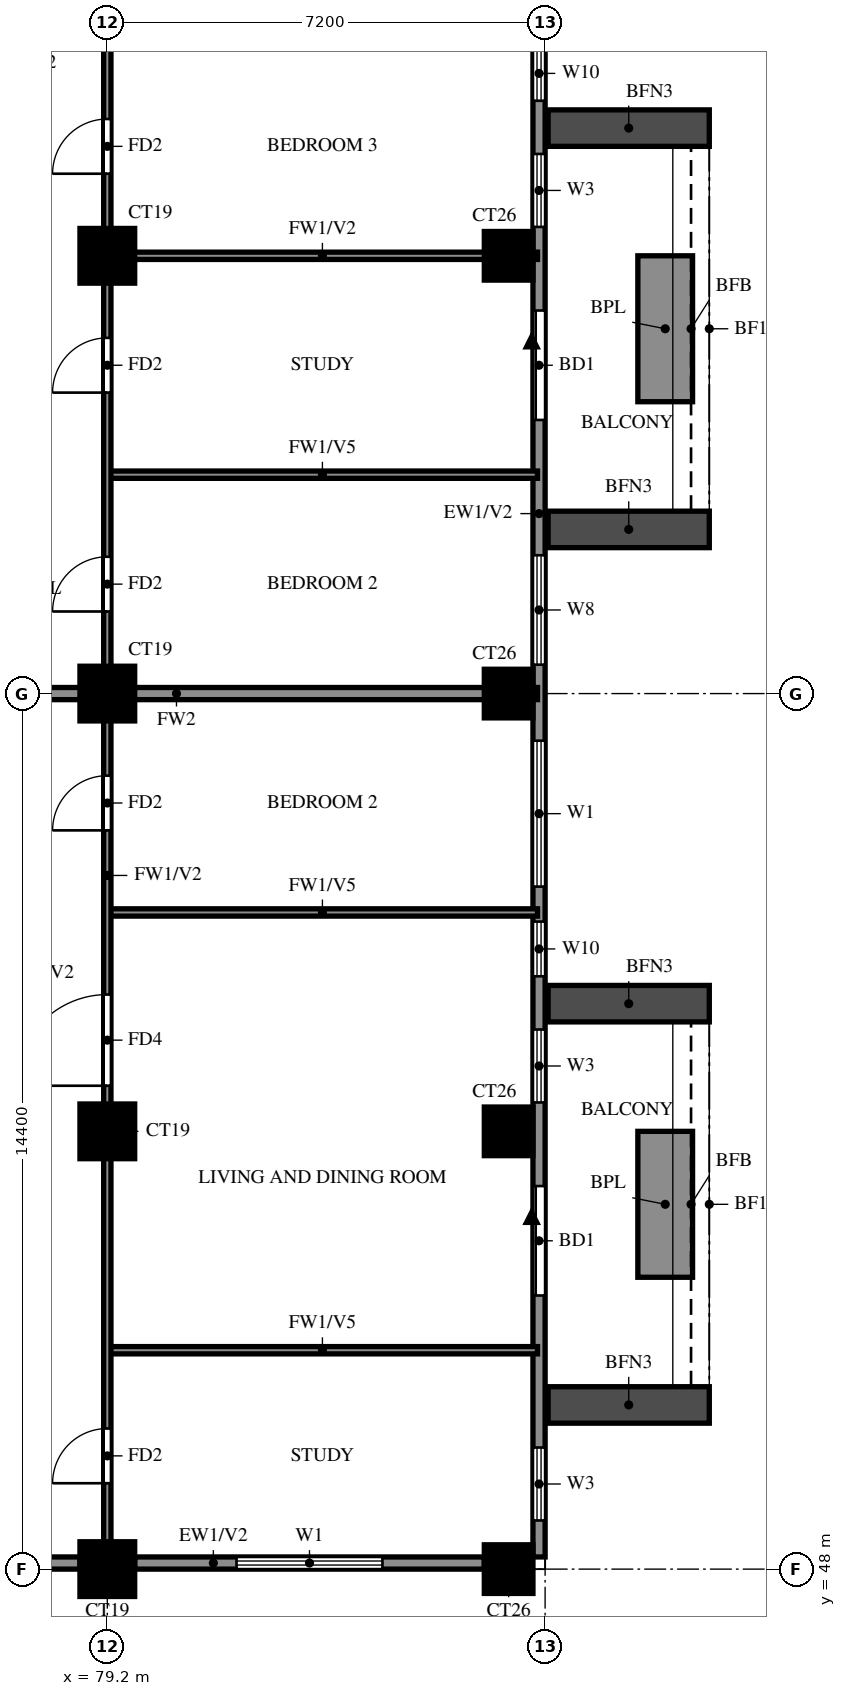
"""IFC4 building model, lengths in metres.
Left out: names, types, materials, properties, quantities, classifications, styles, units other than length and angle.
Written with IfcOpenShell. Run it as: python <this file> out.ifc"""

import sys

from ifc_helpers import new_model, si_unit, direction, frame, frame_2d, origin, origin_2d, place, context, subcontext, project, spatial, rectangle, extrude, source, transform, mapped, element, fill, save


model = new_model("IFC4")
c1 = context("Model", 3, precision=1e-05, world=origin(), true_north=direction((0.0, 1.0)))
c2 = subcontext(c1, "Body", "Model", "MODEL_VIEW")
j1 = project(units=[si_unit("LENGTHUNIT", "METRE"), si_unit("PLANEANGLEUNIT", "RADIAN")], contexts=[c1])
p1 = place(None, origin())
s1 = spatial("IfcSite", under=j1, at=p1, CompositionType="ELEMENT")
p2 = place(p1, origin())
s2 = spatial("IfcBuilding", under=s1, at=p2, CompositionType="ELEMENT")
p3 = place(p2, frame((0.0, 0.0, 188.5)))
s3 = spatial("IfcBuildingStorey", under=s2, at=p3, CompositionType="ELEMENT", Elevation=188.5)
m1 = source(origin(), c2, "Body", "SweptSolid", [
    extrude(rectangle(XDim=0.9, YDim=0.9, at=origin_2d()), origin(), (0.0, 0.0, 1.0), 3.2),
])
p4 = place(p3, frame((79.2, 48.0, 0.0), z_axis=(0.0, 0.0, 1.0), x_axis=(1.0, 0.0, 0.0)))
e1 = element("IfcColumn", 1, at=p4, inside=s3, PredefinedType="COLUMN", context=c2, shape_type="MappedRepresentation", body=[
    mapped(m1, transform((0.0, 0.0, 0.0))),
])
m2 = source(origin(), c2, "Body", "SweptSolid", [
    extrude(rectangle(XDim=0.8, YDim=0.8, at=origin_2d()), origin(), (0.0, 0.0, 1.0), 3.2),
])
p5 = place(p3, frame((85.8, 48.0, 0.0), z_axis=(0.0, 0.0, 1.0), x_axis=(1.0, 0.0, 0.0)))
e2 = element("IfcColumn", 2, at=p5, inside=s3, PredefinedType="COLUMN", context=c2, shape_type="MappedRepresentation", body=[
    mapped(m2, transform((0.0, 0.0, 0.0))),
])
p6 = place(p3, frame((79.2, 55.2, 0.0), z_axis=(0.0, 0.0, 1.0), x_axis=(1.0, 0.0, 0.0)))
e3 = element("IfcColumn", 3, at=p6, inside=s3, PredefinedType="COLUMN", context=c2, shape_type="MappedRepresentation", body=[
    mapped(m1, transform((0.0, 0.0, 0.0))),
])
p7 = place(p3, frame((85.8, 55.2, 0.0), z_axis=(0.0, 0.0, 1.0), x_axis=(1.0, 0.0, 0.0)))
e4 = element("IfcColumn", 4, at=p7, inside=s3, PredefinedType="COLUMN", context=c2, shape_type="MappedRepresentation", body=[
    mapped(m2, transform((0.0, 0.0, 0.0))),
])
p8 = place(p3, frame((79.2, 62.4, 0.0), z_axis=(0.0, 0.0, 1.0), x_axis=(1.0, 0.0, 0.0)))
e5 = element("IfcColumn", 5, at=p8, inside=s3, PredefinedType="COLUMN", context=c2, shape_type="MappedRepresentation", body=[
    mapped(m1, transform((0.0, 0.0, 0.0))),
])
p9 = place(p3, frame((85.8, 62.4, 0.0), z_axis=(0.0, 0.0, 1.0), x_axis=(1.0, 0.0, 0.0)))
e6 = element("IfcColumn", 6, at=p9, inside=s3, PredefinedType="COLUMN", context=c2, shape_type="MappedRepresentation", body=[
    mapped(m2, transform((0.0, 0.0, 0.0))),
])
p10 = place(p3, frame((79.2, 69.6, 0.0), z_axis=(0.0, 0.0, 1.0), x_axis=(1.0, 0.0, 0.0)))
e7 = element("IfcColumn", 7, at=p10, inside=s3, PredefinedType="COLUMN", context=c2, shape_type="MappedRepresentation", body=[
    mapped(m1, transform((0.0, 0.0, 0.0))),
])
p11 = place(p3, frame((85.8, 69.6, 0.0), z_axis=(0.0, 0.0, 1.0), x_axis=(1.0, 0.0, 0.0)))
e8 = element("IfcColumn", 8, at=p11, inside=s3, PredefinedType="COLUMN", context=c2, shape_type="MappedRepresentation", body=[
    mapped(m2, transform((0.0, 0.0, 0.0))),
])
p12 = place(p3, frame((85.719, 39.881, 0.0), z_axis=(0.0, 0.0, 1.0), x_axis=(-0.86377618652, 0.503875678716, 0.0)))
e9 = element("IfcWall", 9, at=p12, inside=s3, PredefinedType="SOLIDWALL", context=c2, shape_type="SweptSolid", body=[
    extrude(rectangle(XDim=16.311, YDim=0.2, at=frame_2d((8.156, 0.0))), origin(), (0.0, 0.0, 1.0), 3.2),
])
p13 = place(p12, frame((13.326, 0.0, 1.5)))
e10 = element("IfcOpeningElement", 10, at=p13, cuts=e9, PredefinedType="OPENING", context=c2, shape_type="SweptSolid", body=[
    extrude(rectangle(XDim=0.9, YDim=0.9, at=frame_2d((0.45, 0.45))), frame((0.0, 0.11, 0.0), z_axis=(0.0, -1.0, 0.0), x_axis=(1.0, 0.0, 0.0)), (0.0, 0.0, 1.0), 0.22),
])
p14 = place(p3, frame((71.99, 48.1, 0.0), z_axis=(0.0, 0.0, 1.0), x_axis=(1.0, 0.0, 0.0)))
e11 = element("IfcWall", 11, at=p14, inside=s3, PredefinedType="SOLIDWALL", context=c2, shape_type="SweptSolid", body=[
    extrude(rectangle(XDim=6.76, YDim=0.2, at=frame_2d((3.38, 0.0))), origin(), (0.0, 0.0, 1.0), 3.2),
])
p15 = place(p14, frame((2.205, 0.0, 1.5)))
e12 = element("IfcOpeningElement", 12, at=p15, cuts=e11, PredefinedType="OPENING", context=c2, shape_type="SweptSolid", body=[
    extrude(rectangle(XDim=0.9, YDim=0.9, at=frame_2d((0.45, 0.45))), frame((0.0, 0.11, 0.0), z_axis=(0.0, -1.0, 0.0), x_axis=(1.0, 0.0, 0.0)), (0.0, 0.0, 1.0), 0.22),
])
p16 = place(p3, frame((79.65, 48.1, 0.0), z_axis=(0.0, 0.0, 1.0), x_axis=(1.0, 0.0, 0.0)))
e13 = element("IfcWall", 13, at=p16, inside=s3, PredefinedType="SOLIDWALL", context=c2, shape_type="SweptSolid", body=[
    extrude(rectangle(XDim=5.75, YDim=0.2, at=frame_2d((2.875, 0.0))), origin(), (0.0, 0.0, 1.0), 3.2),
])
p17 = place(p16, frame((1.675, 0.0, 0.6)))
e14 = element("IfcOpeningElement", 14, at=p17, cuts=e13, PredefinedType="OPENING", context=c2, shape_type="SweptSolid", body=[
    extrude(rectangle(XDim=2.4, YDim=2.4, at=frame_2d((1.2, 1.2))), frame((0.0, 0.11, 0.0), z_axis=(0.0, -1.0, 0.0), x_axis=(1.0, 0.0, 0.0)), (0.0, 0.0, 1.0), 0.22),
])
p18 = place(p3, frame((86.3, 48.2, 0.0), z_axis=(0.0, 0.0, 1.0), x_axis=(0.0, 1.0, 0.0)))
e15 = element("IfcWall", 15, at=p18, inside=s3, PredefinedType="SOLIDWALL", context=c2, shape_type="SweptSolid", body=[
    extrude(rectangle(XDim=28.6, YDim=0.2, at=frame_2d((14.3, 0.0))), origin(), (0.0, 0.0, 1.0), 3.2),
])
p19 = place(p18, frame((4.3, 0.0, 0.0)))
e16 = element("IfcOpeningElement", 16, at=p19, cuts=e15, PredefinedType="OPENING", context=c2, shape_type="SweptSolid", body=[
    extrude(rectangle(XDim=1.8, YDim=2.4, at=frame_2d((0.9, 1.2))), frame((0.0, 0.11, 0.0), z_axis=(0.0, -1.0, 0.0), x_axis=(1.0, 0.0, 0.0)), (0.0, 0.0, 1.0), 0.22),
])
p20 = place(p18, frame((18.7, 0.0, 0.0)))
e17 = element("IfcOpeningElement", 17, at=p20, cuts=e15, PredefinedType="OPENING", context=c2, shape_type="SweptSolid", body=[
    extrude(rectangle(XDim=1.8, YDim=2.4, at=frame_2d((0.9, 1.2))), frame((0.0, 0.11, 0.0), z_axis=(0.0, -1.0, 0.0), x_axis=(1.0, 0.0, 0.0)), (0.0, 0.0, 1.0), 0.22),
])
p21 = place(p18, frame((0.6, 0.0, 0.6)))
e18 = element("IfcOpeningElement", 18, at=p21, cuts=e15, PredefinedType="OPENING", context=c2, shape_type="SweptSolid", body=[
    extrude(rectangle(XDim=1.2, YDim=2.4, at=frame_2d((0.6, 1.2))), frame((0.0, 0.11, 0.0), z_axis=(0.0, -1.0, 0.0), x_axis=(1.0, 0.0, 0.0)), (0.0, 0.0, 1.0), 0.22),
])
p22 = place(p18, frame((7.475, 0.0, 0.6)))
e19 = element("IfcOpeningElement", 19, at=p22, cuts=e15, PredefinedType="OPENING", context=c2, shape_type="SweptSolid", body=[
    extrude(rectangle(XDim=1.2, YDim=2.4, at=frame_2d((0.6, 1.2))), frame((0.0, 0.11, 0.0), z_axis=(0.0, -1.0, 0.0), x_axis=(1.0, 0.0, 0.0)), (0.0, 0.0, 1.0), 0.22),
])
p23 = place(p18, frame((9.55, 0.0, 0.6)))
e20 = element("IfcOpeningElement", 20, at=p23, cuts=e15, PredefinedType="OPENING", context=c2, shape_type="SweptSolid", body=[
    extrude(rectangle(XDim=0.9, YDim=2.4, at=frame_2d((0.45, 1.2))), frame((0.0, 0.11, 0.0), z_axis=(0.0, -1.0, 0.0), x_axis=(1.0, 0.0, 0.0)), (0.0, 0.0, 1.0), 0.22),
])
p24 = place(p18, frame((11.025, 0.0, 0.6)))
e21 = element("IfcOpeningElement", 21, at=p24, cuts=e15, PredefinedType="OPENING", context=c2, shape_type="SweptSolid", body=[
    extrude(rectangle(XDim=2.4, YDim=2.4, at=frame_2d((1.2, 1.2))), frame((0.0, 0.11, 0.0), z_axis=(0.0, -1.0, 0.0), x_axis=(1.0, 0.0, 0.0)), (0.0, 0.0, 1.0), 0.22),
])
p25 = place(p18, frame((14.675, 0.0, 0.6)))
e22 = element("IfcOpeningElement", 22, at=p25, cuts=e15, PredefinedType="OPENING", context=c2, shape_type="SweptSolid", body=[
    extrude(rectangle(XDim=1.8, YDim=2.4, at=frame_2d((0.9, 1.2))), frame((0.0, 0.11, 0.0), z_axis=(0.0, -1.0, 0.0), x_axis=(1.0, 0.0, 0.0)), (0.0, 0.0, 1.0), 0.22),
])
p26 = place(p18, frame((21.875, 0.0, 0.6)))
e23 = element("IfcOpeningElement", 23, at=p26, cuts=e15, PredefinedType="OPENING", context=c2, shape_type="SweptSolid", body=[
    extrude(rectangle(XDim=1.2, YDim=2.4, at=frame_2d((0.6, 1.2))), frame((0.0, 0.11, 0.0), z_axis=(0.0, -1.0, 0.0), x_axis=(1.0, 0.0, 0.0)), (0.0, 0.0, 1.0), 0.22),
])
p27 = place(p18, frame((23.95, 0.0, 0.6)))
e24 = element("IfcOpeningElement", 24, at=p27, cuts=e15, PredefinedType="OPENING", context=c2, shape_type="SweptSolid", body=[
    extrude(rectangle(XDim=0.9, YDim=2.4, at=frame_2d((0.45, 1.2))), frame((0.0, 0.11, 0.0), z_axis=(0.0, -1.0, 0.0), x_axis=(1.0, 0.0, 0.0)), (0.0, 0.0, 1.0), 0.22),
])
p28 = place(p18, frame((25.425, 0.0, 0.6)))
e25 = element("IfcOpeningElement", 25, at=p28, cuts=e15, PredefinedType="OPENING", context=c2, shape_type="SweptSolid", body=[
    extrude(rectangle(XDim=2.4, YDim=2.4, at=frame_2d((1.2, 1.2))), frame((0.0, 0.11, 0.0), z_axis=(0.0, -1.0, 0.0), x_axis=(1.0, 0.0, 0.0)), (0.0, 0.0, 1.0), 0.22),
])
for number, where, z_axis, x_axis in (
    (26, (86.45, 50.7, 0.0), (0.0, 0.0, 1.0), (1.0, 0.0, 0.0)),
    (27, (86.45, 57.3, 0.0), (0.0, 0.0, 1.0), (1.0, 0.0, 0.0)),
):
    element("IfcWall", number, at=place(p3, frame(where, z_axis=z_axis, x_axis=x_axis)), inside=s3, PredefinedType="SOLIDWALL", context=c2, shape_type="SweptSolid", body=[
        extrude(rectangle(XDim=2.65, YDim=0.6, at=frame_2d((1.325, 0.0))), origin(), (0.0, 0.0, 1.0), 2.85),
    ])
p29 = place(p3, frame((88.375, 52.8, 0.0), z_axis=(0.0, 0.0, 1.0), x_axis=(0.0, 1.0, 0.0)))
e28 = element("IfcWall", 28, at=p29, inside=s3, PredefinedType="SOLIDWALL", context=c2, shape_type="SweptSolid", body=[
    extrude(rectangle(XDim=2.4, YDim=0.9, at=frame_2d((1.2, 0.0))), origin(), (0.0, 0.0, 1.0), 0.9),
])
for number, where, z_axis, x_axis in (
    (29, (86.45, 65.1, 0.0), (0.0, 0.0, 1.0), (1.0, 0.0, 0.0)),
    (30, (86.45, 71.7, 0.0), (0.0, 0.0, 1.0), (1.0, 0.0, 0.0)),
):
    element("IfcWall", number, at=place(p3, frame(where, z_axis=z_axis, x_axis=x_axis)), inside=s3, PredefinedType="SOLIDWALL", context=c2, shape_type="SweptSolid", body=[
        extrude(rectangle(XDim=2.65, YDim=0.6, at=frame_2d((1.325, 0.0))), origin(), (0.0, 0.0, 1.0), 2.85),
    ])
p30 = place(p3, frame((88.375, 67.2, 0.0), z_axis=(0.0, 0.0, 1.0), x_axis=(0.0, 1.0, 0.0)))
e31 = element("IfcWall", 31, at=p30, inside=s3, PredefinedType="SOLIDWALL", context=c2, shape_type="SweptSolid", body=[
    extrude(rectangle(XDim=2.4, YDim=0.9, at=frame_2d((1.2, 0.0))), origin(), (0.0, 0.0, 1.0), 0.9),
])
p31 = place(p3, frame((74.4, 62.4, 0.0), z_axis=(0.0, 0.0, 1.0), x_axis=(1.0, 0.0, 0.0)))
e32 = element("IfcWall", 32, at=p31, inside=s3, PredefinedType="SOLIDWALL", context=c2, shape_type="SweptSolid", body=[
    extrude(rectangle(XDim=11.875, YDim=0.2, at=frame_2d((5.938, 0.0))), origin(), (0.0, 0.0, 1.0), 3.2),
])
for number, where, z_axis, x_axis in (
    (33, (79.2, 51.6, 0.0), (0.0, 0.0, 1.0), (1.0, 0.0, 0.0)),
    (34, (79.2, 58.8, 0.0), (0.0, 0.0, 1.0), (1.0, 0.0, 0.0)),
    (35, (79.2, 66.0, 0.0), (0.0, 0.0, 1.0), (1.0, 0.0, 0.0)),
):
    element("IfcWall", number, at=place(p3, frame(where, z_axis=z_axis, x_axis=x_axis)), inside=s3, PredefinedType="PARTITIONING", context=c2, shape_type="SweptSolid", body=[
        extrude(rectangle(XDim=7.075, YDim=0.12, at=frame_2d((3.538, 0.0))), origin(), (0.0, 0.0, 1.0), 2.3),
    ])
p32 = place(p3, frame((79.2, 69.6, 0.0), z_axis=(0.0, 0.0, 1.0), x_axis=(1.0, 0.0, 0.0)))
e36 = element("IfcWall", 36, at=p32, inside=s3, PredefinedType="PARTITIONING", context=c2, shape_type="SweptSolid", body=[
    extrude(rectangle(XDim=7.075, YDim=0.12, at=frame_2d((3.538, 0.0))), origin(), (0.0, 0.0, 1.0), 3.2),
])
p33 = place(p3, frame((79.2, 48.125, 0.0), z_axis=(0.0, 0.0, 1.0), x_axis=(0.0, 1.0, 0.0)))
e37 = element("IfcWall", 37, at=p33, inside=s3, PredefinedType="PARTITIONING", context=c2, shape_type="SweptSolid", body=[
    extrude(rectangle(XDim=25.075, YDim=0.12, at=frame_2d((12.538, 0.0))), origin(), (0.0, 0.0, 1.0), 3.2),
])
p34 = place(p33, frame((1.288, 0.0, 0.0)))
e38 = element("IfcOpeningElement", 38, at=p34, cuts=e37, PredefinedType="OPENING", context=c2, shape_type="SweptSolid", body=[
    extrude(rectangle(XDim=0.9, YDim=2.1, at=frame_2d((0.45, 1.05))), frame((0.0, 0.07, 0.0), z_axis=(0.0, -1.0, 0.0), x_axis=(1.0, 0.0, 0.0)), (0.0, 0.0, 1.0), 0.14),
])
p35 = place(p33, frame((7.825, 0.0, 0.0)))
e39 = element("IfcOpeningElement", 39, at=p35, cuts=e37, PredefinedType="OPENING", context=c2, shape_type="SweptSolid", body=[
    extrude(rectangle(XDim=1.5, YDim=2.1, at=frame_2d((0.75, 1.05))), frame((0.0, 0.07, 0.0), z_axis=(0.0, -1.0, 0.0), x_axis=(1.0, 0.0, 0.0)), (0.0, 0.0, 1.0), 0.14),
])
p36 = place(p33, frame((12.025, 0.0, 0.0)))
e40 = element("IfcOpeningElement", 40, at=p36, cuts=e37, PredefinedType="OPENING", context=c2, shape_type="SweptSolid", body=[
    extrude(rectangle(XDim=0.9, YDim=2.1, at=frame_2d((0.45, 1.05))), frame((0.0, 0.07, 0.0), z_axis=(0.0, -1.0, 0.0), x_axis=(1.0, 0.0, 0.0)), (0.0, 0.0, 1.0), 0.14),
])
p37 = place(p33, frame((15.625, 0.0, 0.0)))
e41 = element("IfcOpeningElement", 41, at=p37, cuts=e37, PredefinedType="OPENING", context=c2, shape_type="SweptSolid", body=[
    extrude(rectangle(XDim=0.9, YDim=2.1, at=frame_2d((0.45, 1.05))), frame((0.0, 0.07, 0.0), z_axis=(0.0, -1.0, 0.0), x_axis=(1.0, 0.0, 0.0)), (0.0, 0.0, 1.0), 0.14),
])
p38 = place(p33, frame((19.225, 0.0, 0.0)))
e42 = element("IfcOpeningElement", 42, at=p38, cuts=e37, PredefinedType="OPENING", context=c2, shape_type="SweptSolid", body=[
    extrude(rectangle(XDim=0.9, YDim=2.1, at=frame_2d((0.45, 1.05))), frame((0.0, 0.07, 0.0), z_axis=(0.0, -1.0, 0.0), x_axis=(1.0, 0.0, 0.0)), (0.0, 0.0, 1.0), 0.14),
])
p39 = place(p33, frame((22.825, 0.0, 0.0)))
e43 = element("IfcOpeningElement", 43, at=p39, cuts=e37, PredefinedType="OPENING", context=c2, shape_type="SweptSolid", body=[
    extrude(rectangle(XDim=0.9, YDim=2.1, at=frame_2d((0.45, 1.05))), frame((0.0, 0.07, 0.0), z_axis=(0.0, -1.0, 0.0), x_axis=(1.0, 0.0, 0.0)), (0.0, 0.0, 1.0), 0.14),
])
p40 = place(p17, origin())
e44 = element("IfcWindow", 44, at=p40, inside=s3, PartitioningType="DOUBLE_PANEL_VERTICAL", PredefinedType="WINDOW", context=c2, shape_type="SweptSolid", body=[
    extrude(rectangle(XDim=2.4, YDim=2.4, at=frame_2d((1.2, 1.2))), frame((0.0, 0.03, 0.0), z_axis=(0.0, -1.0, 0.0), x_axis=(1.0, 0.0, 0.0)), (0.0, 0.0, 1.0), 0.06),
])
fill(e14, e44)
p41 = place(p19, origin())
e45 = element("IfcDoor", 45, at=p41, inside=s3, OperationType="DOUBLE_DOOR_SLIDING", PredefinedType="DOOR", context=c2, shape_type="SweptSolid", body=[
    extrude(rectangle(XDim=1.8, YDim=2.4, at=frame_2d((0.9, 1.2))), frame((0.0, 0.025, 0.0), z_axis=(0.0, -1.0, 0.0), x_axis=(1.0, 0.0, 0.0)), (0.0, 0.0, 1.0), 0.05),
])
fill(e16, e45)
p42 = place(p20, origin())
e46 = element("IfcDoor", 46, at=p42, inside=s3, OperationType="DOUBLE_DOOR_SLIDING", PredefinedType="DOOR", context=c2, shape_type="SweptSolid", body=[
    extrude(rectangle(XDim=1.8, YDim=2.4, at=frame_2d((0.9, 1.2))), frame((0.0, 0.025, 0.0), z_axis=(0.0, -1.0, 0.0), x_axis=(1.0, 0.0, 0.0)), (0.0, 0.0, 1.0), 0.05),
])
fill(e17, e46)
p43 = place(p21, origin())
e47 = element("IfcWindow", 47, at=p43, inside=s3, PartitioningType="SINGLE_PANEL", PredefinedType="WINDOW", context=c2, shape_type="SweptSolid", body=[
    extrude(rectangle(XDim=1.2, YDim=2.4, at=frame_2d((0.6, 1.2))), frame((0.0, 0.03, 0.0), z_axis=(0.0, -1.0, 0.0), x_axis=(1.0, 0.0, 0.0)), (0.0, 0.0, 1.0), 0.06),
])
fill(e18, e47)
p44 = place(p22, origin())
e48 = element("IfcWindow", 48, at=p44, inside=s3, PartitioningType="SINGLE_PANEL", PredefinedType="WINDOW", context=c2, shape_type="SweptSolid", body=[
    extrude(rectangle(XDim=1.2, YDim=2.4, at=frame_2d((0.6, 1.2))), frame((0.0, 0.03, 0.0), z_axis=(0.0, -1.0, 0.0), x_axis=(1.0, 0.0, 0.0)), (0.0, 0.0, 1.0), 0.06),
])
fill(e19, e48)
p45 = place(p23, origin())
e49 = element("IfcWindow", 49, at=p45, inside=s3, PartitioningType="SINGLE_PANEL", PredefinedType="WINDOW", context=c2, shape_type="SweptSolid", body=[
    extrude(rectangle(XDim=0.9, YDim=2.4, at=frame_2d((0.45, 1.2))), frame((0.0, 0.03, 0.0), z_axis=(0.0, -1.0, 0.0), x_axis=(1.0, 0.0, 0.0)), (0.0, 0.0, 1.0), 0.06),
])
fill(e20, e49)
p46 = place(p24, origin())
e50 = element("IfcWindow", 50, at=p46, inside=s3, PartitioningType="DOUBLE_PANEL_VERTICAL", PredefinedType="WINDOW", context=c2, shape_type="SweptSolid", body=[
    extrude(rectangle(XDim=2.4, YDim=2.4, at=frame_2d((1.2, 1.2))), frame((0.0, 0.03, 0.0), z_axis=(0.0, -1.0, 0.0), x_axis=(1.0, 0.0, 0.0)), (0.0, 0.0, 1.0), 0.06),
])
fill(e21, e50)
p47 = place(p25, origin())
e51 = element("IfcWindow", 51, at=p47, inside=s3, PartitioningType="DOUBLE_PANEL_VERTICAL", PredefinedType="WINDOW", context=c2, shape_type="SweptSolid", body=[
    extrude(rectangle(XDim=1.8, YDim=2.4, at=frame_2d((0.9, 1.2))), frame((0.0, 0.03, 0.0), z_axis=(0.0, -1.0, 0.0), x_axis=(1.0, 0.0, 0.0)), (0.0, 0.0, 1.0), 0.06),
])
fill(e22, e51)
p48 = place(p26, origin())
e52 = element("IfcWindow", 52, at=p48, inside=s3, PartitioningType="SINGLE_PANEL", PredefinedType="WINDOW", context=c2, shape_type="SweptSolid", body=[
    extrude(rectangle(XDim=1.2, YDim=2.4, at=frame_2d((0.6, 1.2))), frame((0.0, 0.03, 0.0), z_axis=(0.0, -1.0, 0.0), x_axis=(1.0, 0.0, 0.0)), (0.0, 0.0, 1.0), 0.06),
])
fill(e23, e52)
p49 = place(p27, origin())
e53 = element("IfcWindow", 53, at=p49, inside=s3, PartitioningType="SINGLE_PANEL", PredefinedType="WINDOW", context=c2, shape_type="SweptSolid", body=[
    extrude(rectangle(XDim=0.9, YDim=2.4, at=frame_2d((0.45, 1.2))), frame((0.0, 0.03, 0.0), z_axis=(0.0, -1.0, 0.0), x_axis=(1.0, 0.0, 0.0)), (0.0, 0.0, 1.0), 0.06),
])
fill(e24, e53)
p50 = place(p34, origin())
e54 = element("IfcDoor", 54, at=p50, inside=s3, OperationType="SINGLE_SWING_LEFT", PredefinedType="DOOR", context=c2, shape_type="SweptSolid", body=[
    extrude(rectangle(XDim=0.9, YDim=2.1, at=frame_2d((0.45, 1.05))), frame((0.0, 0.025, 0.0), z_axis=(0.0, -1.0, 0.0), x_axis=(1.0, 0.0, 0.0)), (0.0, 0.0, 1.0), 0.05),
])
fill(e38, e54)
p51 = place(p35, origin())
e55 = element("IfcDoor", 55, at=p51, inside=s3, OperationType="SINGLE_SWING_LEFT", PredefinedType="DOOR", context=c2, shape_type="SweptSolid", body=[
    extrude(rectangle(XDim=1.5, YDim=2.1, at=frame_2d((0.75, 1.05))), frame((0.0, 0.025, 0.0), z_axis=(0.0, -1.0, 0.0), x_axis=(1.0, 0.0, 0.0)), (0.0, 0.0, 1.0), 0.05),
])
fill(e39, e55)
p52 = place(p36, origin())
e56 = element("IfcDoor", 56, at=p52, inside=s3, OperationType="SINGLE_SWING_LEFT", PredefinedType="DOOR", context=c2, shape_type="SweptSolid", body=[
    extrude(rectangle(XDim=0.9, YDim=2.1, at=frame_2d((0.45, 1.05))), frame((0.0, 0.025, 0.0), z_axis=(0.0, -1.0, 0.0), x_axis=(1.0, 0.0, 0.0)), (0.0, 0.0, 1.0), 0.05),
])
fill(e40, e56)
p53 = place(p37, origin())
e57 = element("IfcDoor", 57, at=p53, inside=s3, OperationType="SINGLE_SWING_LEFT", PredefinedType="DOOR", context=c2, shape_type="SweptSolid", body=[
    extrude(rectangle(XDim=0.9, YDim=2.1, at=frame_2d((0.45, 1.05))), frame((0.0, 0.025, 0.0), z_axis=(0.0, -1.0, 0.0), x_axis=(1.0, 0.0, 0.0)), (0.0, 0.0, 1.0), 0.05),
])
fill(e41, e57)
p54 = place(p38, origin())
e58 = element("IfcDoor", 58, at=p54, inside=s3, OperationType="SINGLE_SWING_LEFT", PredefinedType="DOOR", context=c2, shape_type="SweptSolid", body=[
    extrude(rectangle(XDim=0.9, YDim=2.1, at=frame_2d((0.45, 1.05))), frame((0.0, 0.025, 0.0), z_axis=(0.0, -1.0, 0.0), x_axis=(1.0, 0.0, 0.0)), (0.0, 0.0, 1.0), 0.05),
])
fill(e42, e58)
p55 = place(p39, origin())
e59 = element("IfcDoor", 59, at=p55, inside=s3, OperationType="SINGLE_SWING_RIGHT", PredefinedType="DOOR", context=c2, shape_type="SweptSolid", body=[
    extrude(rectangle(XDim=0.9, YDim=2.1, at=frame_2d((0.45, 1.05))), frame((0.0, 0.025, 0.0), z_axis=(0.0, -1.0, 0.0), x_axis=(1.0, 0.0, 0.0)), (0.0, 0.0, 1.0), 0.05),
])
fill(e43, e59)
save(model, sys.argv[1])
